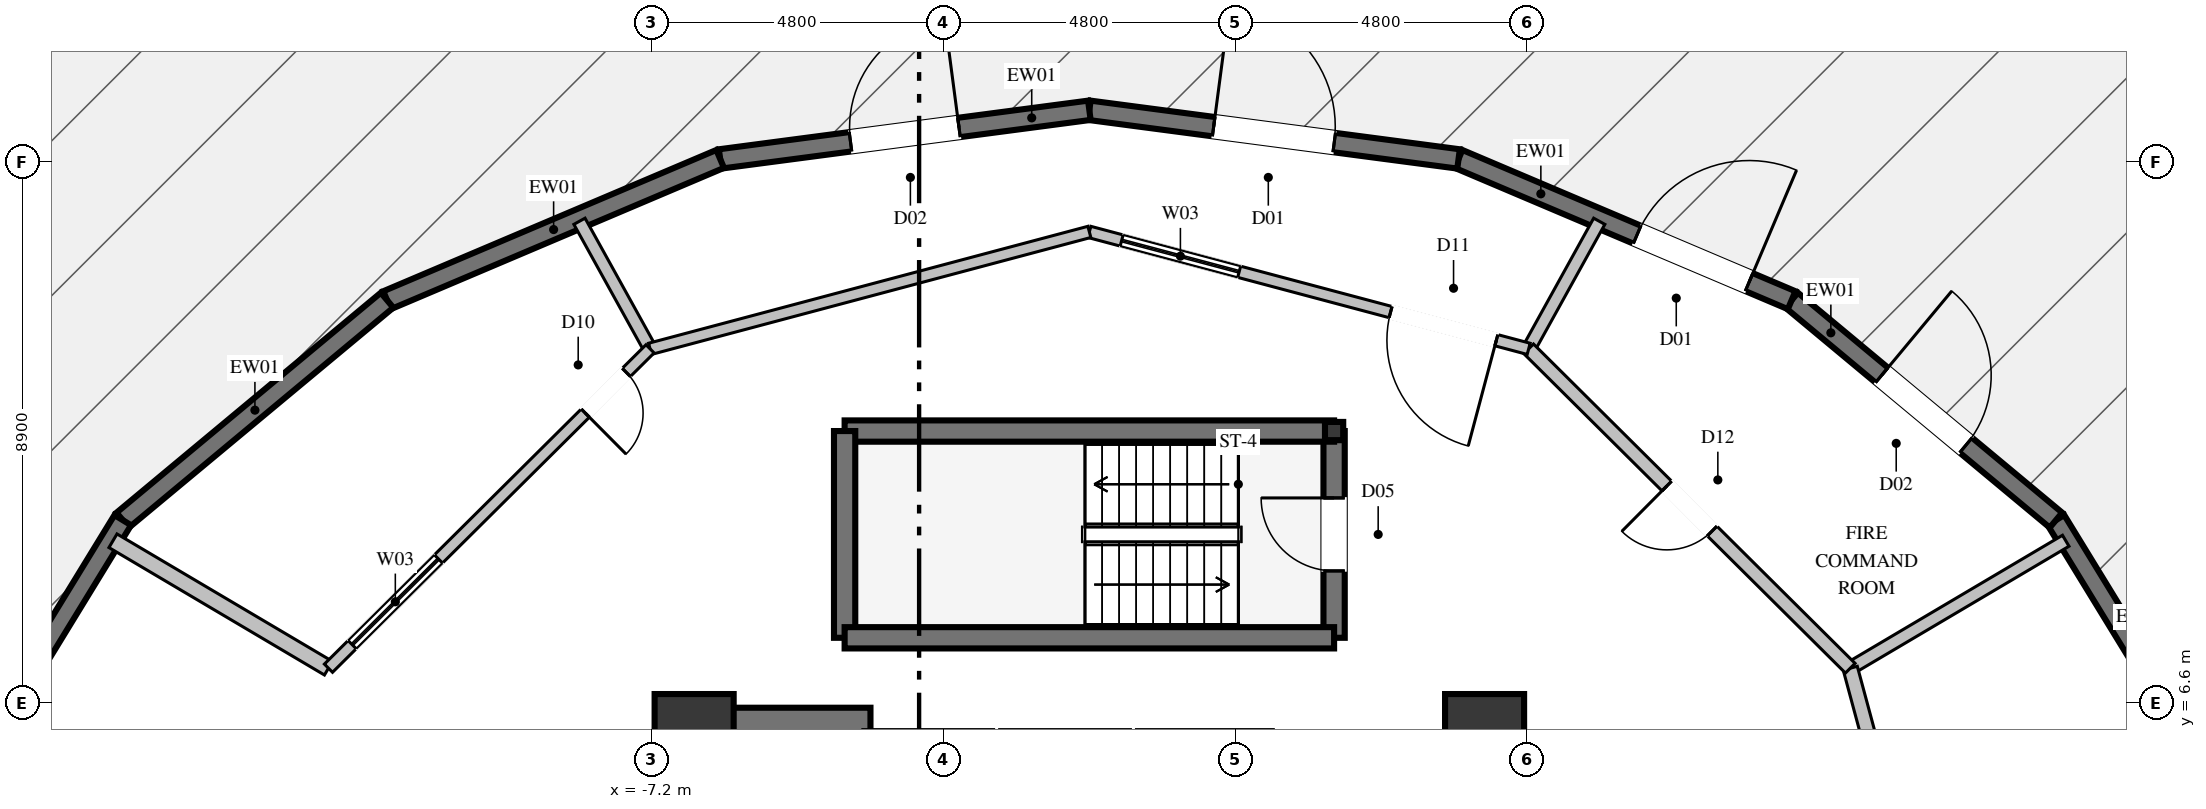
"""IFC4 building model, lengths in metres.
Left out: names, types, materials, properties, quantities, classifications, styles, units other than length and angle.
Written with IfcOpenShell. Run it as: python <this file> out.ifc"""

import sys

from ifc_helpers import new_model, si_unit, direction, frame, frame_2d, origin, origin_2d, place, context, subcontext, project, spatial, rectangle, hollow_rectangle, extrude, element, fill, save


model = new_model("IFC4")
c1 = context("Model", 3, precision=1e-05, world=origin(), true_north=direction((0.0, 1.0)))
c2 = subcontext(c1, "Body", "Model", "MODEL_VIEW")
j1 = project(units=[si_unit("LENGTHUNIT", "METRE"), si_unit("PLANEANGLEUNIT", "RADIAN")], contexts=[c1])
p1 = place(None, origin())
s1 = spatial("IfcSite", under=j1, at=p1, CompositionType="ELEMENT")
p2 = place(p1, origin())
s2 = spatial("IfcBuilding", under=s1, at=p2, CompositionType="ELEMENT")
p3 = place(p2, origin())
s3 = spatial("IfcBuildingStorey", under=s2, at=p3, CompositionType="ELEMENT", Elevation=0.0)
for number, where, z_axis, x_axis in (
    (1, (6.5, 6.1, 0.0), (0.0, 0.0, 1.0), (1.0, 0.0, 0.0)),
    (2, (-6.5, 6.1, 0.0), (0.0, 0.0, 1.0), (1.0, 0.0, 0.0)),
):
    element("IfcColumn", number, at=place(p3, frame(where, z_axis=z_axis, x_axis=x_axis)), inside=s3, PredefinedType="COLUMN", context=c2, shape_type="SweptSolid", body=[
        extrude(rectangle(XDim=1.3, YDim=1.3, at=origin_2d()), origin(), (0.0, 0.0, 1.0), 7.2),
    ])
p4 = place(p3, frame((-6.075, 6.1, 0.0), z_axis=(0.0, 0.0, 1.0), x_axis=(1.0, 0.0, 0.0)))
e3 = element("IfcWall", 3, at=p4, inside=s3, PredefinedType="SHEAR", context=c2, shape_type="SweptSolid", body=[
    extrude(rectangle(XDim=2.475, YDim=0.85, at=frame_2d((1.237, 0.0))), origin(), (0.0, 0.0, 1.0), 7.2),
])
p5 = place(p3, frame((5.85, 6.1, 0.0), z_axis=(0.0, 0.0, 1.0), x_axis=(1.0, 0.0, 0.0)))
e4 = element("IfcWall", 4, at=p5, inside=s3, PredefinedType="SHEAR", context=c2, shape_type="SweptSolid", body=[
    extrude(rectangle(XDim=0.225, YDim=0.85, at=frame_2d((0.112, 0.0))), origin(), (0.0, 0.0, 1.0), 7.2),
])
p6 = place(p3, frame((-6.5, 2.35, 0.0), z_axis=(0.0, 0.0, 1.0), x_axis=(0.0, 1.0, 0.0)))
e5 = element("IfcWall", 5, at=p6, inside=s3, PredefinedType="SHEAR", context=c2, shape_type="SweptSolid", body=[
    extrude(rectangle(XDim=4.175, YDim=0.85, at=frame_2d((2.087, 0.0))), origin(), (0.0, 0.0, 1.0), 7.2),
])
p7 = place(p3, frame((6.5, 3.35, 0.0), z_axis=(0.0, 0.0, 1.0), x_axis=(0.0, 1.0, 0.0)))
e6 = element("IfcWall", 6, at=p7, inside=s3, PredefinedType="SHEAR", context=c2, shape_type="SweptSolid", body=[
    extrude(rectangle(XDim=3.175, YDim=0.85, at=frame_2d((1.587, 0.0))), origin(), (0.0, 0.0, 1.0), 7.2),
])
p8 = place(p3, frame((4.025, 11.075, 0.0), z_axis=(0.0, 0.0, 1.0), x_axis=(1.0, 0.0, 0.0)))
e7 = element("IfcColumn", 7, at=p8, inside=s3, PredefinedType="COLUMN", context=c2, shape_type="SweptSolid", body=[
    extrude(hollow_rectangle(XDim=0.3, YDim=0.3, WallThickness=0.016, at=origin_2d()), origin(), (0.0, 0.0, 1.0), 7.2),
])
p9 = place(p3, frame((15.897, 9.61, 0.0), z_axis=(0.0, 0.0, 1.0), x_axis=(0.522199966643, -0.852823073585, 0.0)))
e8 = element("IfcWall", 8, at=p9, inside=s3, PredefinedType="SOLIDWALL", context=c2, shape_type="SweptSolid", body=[
    extrude(rectangle(XDim=5.345, YDim=0.32, at=frame_2d((2.672, 0.0))), origin(), (0.0, 0.0, 1.0), 6.84),
])
p10 = place(p3, frame((11.55, 13.227, 0.0), z_axis=(0.0, 0.0, 1.0), x_axis=(0.768698801906, -0.639610937952, 0.0)))
e9 = element("IfcWall", 9, at=p10, inside=s3, PredefinedType="SOLIDWALL", context=c2, shape_type="SweptSolid", body=[
    extrude(rectangle(XDim=5.655, YDim=0.32, at=frame_2d((2.828, 0.0))), origin(), (0.0, 0.0, 1.0), 6.84),
])
p11 = place(p10, frame((1.928, 0.0, 0.0)))
e10 = element("IfcOpeningElement", 10, at=p11, cuts=e9, PredefinedType="OPENING", context=c2, shape_type="SweptSolid", body=[
    extrude(rectangle(XDim=1.8, YDim=2.4, at=frame_2d((0.9, 1.2))), frame((0.0, 0.17, 0.0), z_axis=(0.0, -1.0, 0.0), x_axis=(1.0, 0.0, 0.0)), (0.0, 0.0, 1.0), 0.34),
])
p12 = place(p3, frame((6.072, 15.55, 0.0), z_axis=(0.0, 0.0, 1.0), x_axis=(0.920643013012, -0.390405484839, 0.0)))
e11 = element("IfcWall", 11, at=p12, inside=s3, PredefinedType="SOLIDWALL", context=c2, shape_type="SweptSolid", body=[
    extrude(rectangle(XDim=5.95, YDim=0.32, at=frame_2d((2.975, 0.0))), origin(), (0.0, 0.0, 1.0), 6.84),
])
p13 = place(p12, frame((3.19, 0.0, 0.0)))
e12 = element("IfcOpeningElement", 12, at=p13, cuts=e11, PredefinedType="OPENING", context=c2, shape_type="SweptSolid", body=[
    extrude(rectangle(XDim=2.0, YDim=2.4, at=frame_2d((1.0, 1.2))), frame((0.0, 0.17, 0.0), z_axis=(0.0, -1.0, 0.0), x_axis=(1.0, 0.0, 0.0)), (0.0, 0.0, 1.0), 0.34),
])
p14 = place(p3, frame((0.0, 16.35, 0.0), z_axis=(0.0, 0.0, 1.0), x_axis=(0.991431078494, -0.130630840908, 0.0)))
e13 = element("IfcWall", 13, at=p14, inside=s3, PredefinedType="SOLIDWALL", context=c2, shape_type="SweptSolid", body=[
    extrude(rectangle(XDim=6.125, YDim=0.32, at=frame_2d((3.062, 0.0))), origin(), (0.0, 0.0, 1.0), 6.84),
])
p15 = place(p14, frame((2.062, 0.0, 0.0)))
e14 = element("IfcOpeningElement", 14, at=p15, cuts=e13, PredefinedType="OPENING", context=c2, shape_type="SweptSolid", body=[
    extrude(rectangle(XDim=2.0, YDim=2.4, at=frame_2d((1.0, 1.2))), frame((0.0, 0.17, 0.0), z_axis=(0.0, -1.0, 0.0), x_axis=(1.0, 0.0, 0.0)), (0.0, 0.0, 1.0), 0.34),
])
p16 = place(p3, frame((-6.072, 15.55, 0.0), z_axis=(0.0, 0.0, 1.0), x_axis=(0.991431078494, 0.130630840908, 0.0)))
e15 = element("IfcWall", 15, at=p16, inside=s3, PredefinedType="SOLIDWALL", context=c2, shape_type="SweptSolid", body=[
    extrude(rectangle(XDim=6.125, YDim=0.32, at=frame_2d((3.062, 0.0))), origin(), (0.0, 0.0, 1.0), 6.84),
])
p17 = place(p16, frame((2.162, 0.0, 0.0)))
e16 = element("IfcOpeningElement", 16, at=p17, cuts=e15, PredefinedType="OPENING", context=c2, shape_type="SweptSolid", body=[
    extrude(rectangle(XDim=1.8, YDim=2.4, at=frame_2d((0.9, 1.2))), frame((0.0, 0.17, 0.0), z_axis=(0.0, -1.0, 0.0), x_axis=(1.0, 0.0, 0.0)), (0.0, 0.0, 1.0), 0.34),
])
p18 = place(p3, frame((-11.55, 13.227, 0.0), z_axis=(0.0, 0.0, 1.0), x_axis=(0.920643013012, 0.390405484839, 0.0)))
e17 = element("IfcWall", 17, at=p18, inside=s3, PredefinedType="SOLIDWALL", context=c2, shape_type="SweptSolid", body=[
    extrude(rectangle(XDim=5.95, YDim=0.32, at=frame_2d((2.975, 0.0))), origin(), (0.0, 0.0, 1.0), 6.84),
])
p19 = place(p3, frame((-15.897, 9.61, 0.0), z_axis=(0.0, 0.0, 1.0), x_axis=(0.768698801906, 0.639610937952, 0.0)))
e18 = element("IfcWall", 18, at=p19, inside=s3, PredefinedType="SOLIDWALL", context=c2, shape_type="SweptSolid", body=[
    extrude(rectangle(XDim=5.655, YDim=0.32, at=frame_2d((2.828, 0.0))), origin(), (0.0, 0.0, 1.0), 6.84),
])
p20 = place(p3, frame((-18.688, 5.052, 0.0), z_axis=(0.0, 0.0, 1.0), x_axis=(0.522199966643, 0.852823073585, 0.0)))
e19 = element("IfcWall", 19, at=p20, inside=s3, PredefinedType="SOLIDWALL", context=c2, shape_type="SweptSolid", body=[
    extrude(rectangle(XDim=5.345, YDim=0.32, at=frame_2d((2.672, 0.0))), origin(), (0.0, 0.0, 1.0), 6.84),
])
p21 = place(p3, frame((4.025, 7.675, 0.0), z_axis=(0.0, 0.0, 1.0), x_axis=(0.0, 1.0, 0.0)))
e20 = element("IfcWall", 20, at=p21, inside=s3, PredefinedType="SOLIDWALL", context=c2, shape_type="SweptSolid", body=[
    extrude(rectangle(XDim=3.4, YDim=0.35, at=frame_2d((1.7, 0.0))), origin(), (0.0, 0.0, 1.0), 6.84),
])
p22 = place(p21, frame((1.1, 0.0, 0.0)))
e21 = element("IfcOpeningElement", 21, at=p22, cuts=e20, PredefinedType="OPENING", context=c2, shape_type="SweptSolid", body=[
    extrude(rectangle(XDim=1.2, YDim=2.2, at=frame_2d((0.6, 1.1))), frame((0.0, 0.185, 0.0), z_axis=(0.0, -1.0, 0.0), x_axis=(1.0, 0.0, 0.0)), (0.0, 0.0, 1.0), 0.37),
])
p23 = place(p3, frame((4.025, 11.075, 0.0), z_axis=(0.0, 0.0, 1.0), x_axis=(-1.0, 0.0, 0.0)))
e22 = element("IfcWall", 22, at=p23, inside=s3, PredefinedType="SOLIDWALL", context=c2, shape_type="SweptSolid", body=[
    extrude(rectangle(XDim=8.05, YDim=0.35, at=frame_2d((4.025, 0.0))), origin(), (0.0, 0.0, 1.0), 6.84),
])
p24 = place(p3, frame((-4.025, 11.075, 0.0), z_axis=(0.0, 0.0, 1.0), x_axis=(0.0, -1.0, 0.0)))
e23 = element("IfcWall", 23, at=p24, inside=s3, PredefinedType="SOLIDWALL", context=c2, shape_type="SweptSolid", body=[
    extrude(rectangle(XDim=3.4, YDim=0.35, at=frame_2d((1.7, 0.0))), origin(), (0.0, 0.0, 1.0), 6.84),
])
p25 = place(p3, frame((-4.025, 7.675, 0.0), z_axis=(0.0, 0.0, 1.0), x_axis=(1.0, 0.0, 0.0)))
e24 = element("IfcWall", 24, at=p25, inside=s3, PredefinedType="SOLIDWALL", context=c2, shape_type="SweptSolid", body=[
    extrude(rectangle(XDim=8.05, YDim=0.35, at=frame_2d((4.025, 0.0))), origin(), (0.0, 0.0, 1.0), 6.84),
])
p26 = place(p3, frame((12.514, 7.175, 0.0), z_axis=(0.0, 0.0, 1.0), x_axis=(0.860750596586, 0.509026925101, 0.0)))
e25 = element("IfcWall", 25, at=p26, inside=s3, PredefinedType="PARTITIONING", context=c2, shape_type="SweptSolid", body=[
    extrude(rectangle(XDim=4.118, YDim=0.21, at=frame_2d((2.059, 0.0))), origin(), (0.0, 0.0, 1.0), 4.625),
])
for number, where, z_axis, x_axis in (
    (26, (7.225, 12.427, 0.0), (0.0, 0.0, 1.0), (0.484, 0.875, 0.0)),
    (27, (-7.225, 12.427, 0.0), (0.0, 0.0, 1.0), (-0.484, 0.875, 0.0)),
):
    element("IfcWall", number, at=place(p3, frame(where, z_axis=z_axis, x_axis=x_axis)), inside=s3, PredefinedType="PARTITIONING", context=c2, shape_type="SweptSolid", body=[
        extrude(rectangle(XDim=2.398, YDim=0.21, at=frame_2d((1.199, 0.0))), origin(), (0.0, 0.0, 1.0), 4.625),
    ])
p27 = place(p3, frame((-12.514, 7.175, 0.0), z_axis=(0.0, 0.0, 1.0), x_axis=(-0.860750596586, 0.509026925101, 0.0)))
e28 = element("IfcWall", 28, at=p27, inside=s3, PredefinedType="PARTITIONING", context=c2, shape_type="SweptSolid", body=[
    extrude(rectangle(XDim=4.118, YDim=0.26, at=frame_2d((2.059, 0.0))), origin(), (0.0, 0.0, 1.0), 4.625),
])
p28 = place(p3, frame((14.45, 0.0, 0.0), z_axis=(0.0, 0.0, 1.0), x_axis=(-0.260511833978, 0.965470654322, 0.0)))
e29 = element("IfcWall", 29, at=p28, inside=s3, PredefinedType="PARTITIONING", context=c2, shape_type="SweptSolid", body=[
    extrude(rectangle(XDim=7.432, YDim=0.24, at=frame_2d((3.716, 0.0))), origin(), (0.0, 0.0, 1.0), 6.84),
])
p29 = place(p28, frame((3.241, 0.0, 0.0)))
e30 = element("IfcOpeningElement", 30, at=p29, cuts=e29, PredefinedType="OPENING", context=c2, shape_type="SweptSolid", body=[
    extrude(rectangle(XDim=0.95, YDim=2.1, at=frame_2d((0.475, 1.05))), frame((0.0, 0.13, 0.0), z_axis=(0.0, -1.0, 0.0), x_axis=(1.0, 0.0, 0.0)), (0.0, 0.0, 1.0), 0.26),
])
p30 = place(p3, frame((12.514, 7.175, 0.0), z_axis=(0.0, 0.0, 1.0), x_axis=(-0.709575472763, 0.704629440524, 0.0)))
e31 = element("IfcWall", 31, at=p30, inside=s3, PredefinedType="PARTITIONING", context=c2, shape_type="SweptSolid", body=[
    extrude(rectangle(XDim=7.454, YDim=0.225, at=frame_2d((3.727, 0.0))), origin(), (0.0, 0.0, 1.0), 6.84),
])
p31 = place(p30, frame((3.202, 0.0, 0.0)))
e32 = element("IfcOpeningElement", 32, at=p31, cuts=e31, PredefinedType="OPENING", context=c2, shape_type="SweptSolid", body=[
    extrude(rectangle(XDim=1.05, YDim=2.15, at=frame_2d((0.525, 1.075))), frame((0.0, 0.123, 0.0), z_axis=(0.0, -1.0, 0.0), x_axis=(1.0, 0.0, 0.0)), (0.0, 0.0, 1.0), 0.245),
])
p32 = place(p3, frame((7.225, 12.427, 0.0), z_axis=(0.0, 0.0, 1.0), x_axis=(-0.966354610728, 0.25721346451, 0.0)))
e33 = element("IfcWall", 33, at=p32, inside=s3, PredefinedType="PARTITIONING", context=c2, shape_type="SweptSolid", body=[
    extrude(rectangle(XDim=7.477, YDim=0.19, at=frame_2d((3.738, 0.0))), origin(), (0.0, 0.0, 1.0), 6.84),
])
p33 = place(p32, frame((0.55, 0.0, 0.0)))
e34 = element("IfcOpeningElement", 34, at=p33, cuts=e33, PredefinedType="OPENING", context=c2, shape_type="SweptSolid", body=[
    extrude(rectangle(XDim=1.8, YDim=2.4, at=frame_2d((0.9, 1.2))), frame((0.0, 0.105, 0.0), z_axis=(0.0, -1.0, 0.0), x_axis=(1.0, 0.0, 0.0)), (0.0, 0.0, 1.0), 0.21),
])
p34 = place(p32, frame((4.927, 0.0, 0.9)))
e35 = element("IfcOpeningElement", 35, at=p34, cuts=e33, PredefinedType="OPENING", context=c2, shape_type="SweptSolid", body=[
    extrude(rectangle(XDim=2.0, YDim=1.6, at=frame_2d((1.0, 0.8))), frame((0.0, 0.105, 0.0), z_axis=(0.0, -1.0, 0.0), x_axis=(1.0, 0.0, 0.0)), (0.0, 0.0, 1.0), 0.21),
])
p35 = place(p3, frame((0.0, 14.35, 0.0), z_axis=(0.0, 0.0, 1.0), x_axis=(-0.966354610728, -0.25721346451, 0.0)))
e36 = element("IfcWall", 36, at=p35, inside=s3, PredefinedType="PARTITIONING", context=c2, shape_type="SweptSolid", body=[
    extrude(rectangle(XDim=7.477, YDim=0.19, at=frame_2d((3.738, 0.0))), origin(), (0.0, 0.0, 1.0), 6.84),
])
p36 = place(p3, frame((-7.225, 12.427, 0.0), z_axis=(0.0, 0.0, 1.0), x_axis=(-0.709575472763, -0.704629440524, 0.0)))
e37 = element("IfcWall", 37, at=p36, inside=s3, PredefinedType="PARTITIONING", context=c2, shape_type="SweptSolid", body=[
    extrude(rectangle(XDim=7.454, YDim=0.19, at=frame_2d((3.727, 0.0))), origin(), (0.0, 0.0, 1.0), 6.84),
])
p37 = place(p36, frame((0.55, 0.0, 0.0)))
e38 = element("IfcOpeningElement", 38, at=p37, cuts=e37, PredefinedType="OPENING", context=c2, shape_type="SweptSolid", body=[
    extrude(rectangle(XDim=0.95, YDim=2.1, at=frame_2d((0.475, 1.05))), frame((0.0, 0.105, 0.0), z_axis=(0.0, -1.0, 0.0), x_axis=(1.0, 0.0, 0.0)), (0.0, 0.0, 1.0), 0.21),
])
p38 = place(p36, frame((4.904, 0.0, 0.9)))
e39 = element("IfcOpeningElement", 39, at=p38, cuts=e37, PredefinedType="OPENING", context=c2, shape_type="SweptSolid", body=[
    extrude(rectangle(XDim=2.0, YDim=1.6, at=frame_2d((1.0, 0.8))), frame((0.0, 0.105, 0.0), z_axis=(0.0, -1.0, 0.0), x_axis=(1.0, 0.0, 0.0)), (0.0, 0.0, 1.0), 0.21),
])
p39 = place(p11, origin())
e40 = element("IfcDoor", 40, at=p39, inside=s3, OperationType="SINGLE_SWING_LEFT", PredefinedType="DOOR", context=c2, shape_type="SweptSolid", body=[
    extrude(rectangle(XDim=1.8, YDim=2.4, at=frame_2d((0.9, 1.2))), frame((0.0, 0.025, 0.0), z_axis=(0.0, -1.0, 0.0), x_axis=(1.0, 0.0, 0.0)), (0.0, 0.0, 1.0), 0.05),
])
fill(e10, e40)
p40 = place(p13, origin())
e41 = element("IfcDoor", 41, at=p40, inside=s3, OperationType="SINGLE_SWING_RIGHT", PredefinedType="DOOR", context=c2, shape_type="SweptSolid", body=[
    extrude(rectangle(XDim=2.0, YDim=2.4, at=frame_2d((1.0, 1.2))), frame((0.0, 0.025, 0.0), z_axis=(0.0, -1.0, 0.0), x_axis=(1.0, 0.0, 0.0)), (0.0, 0.0, 1.0), 0.05),
])
fill(e12, e41)
p41 = place(p15, origin())
e42 = element("IfcDoor", 42, at=p41, inside=s3, OperationType="SINGLE_SWING_LEFT", PredefinedType="DOOR", context=c2, shape_type="SweptSolid", body=[
    extrude(rectangle(XDim=2.0, YDim=2.4, at=frame_2d((1.0, 1.2))), frame((0.0, 0.025, 0.0), z_axis=(0.0, -1.0, 0.0), x_axis=(1.0, 0.0, 0.0)), (0.0, 0.0, 1.0), 0.05),
])
fill(e14, e42)
p42 = place(p17, origin())
e43 = element("IfcDoor", 43, at=p42, inside=s3, OperationType="SINGLE_SWING_RIGHT", PredefinedType="DOOR", context=c2, shape_type="SweptSolid", body=[
    extrude(rectangle(XDim=1.8, YDim=2.4, at=frame_2d((0.9, 1.2))), frame((0.0, 0.025, 0.0), z_axis=(0.0, -1.0, 0.0), x_axis=(1.0, 0.0, 0.0)), (0.0, 0.0, 1.0), 0.05),
])
fill(e16, e43)
p43 = place(p22, origin())
e44 = element("IfcDoor", 44, at=p43, inside=s3, OperationType="SINGLE_SWING_RIGHT", PredefinedType="DOOR", context=c2, shape_type="SweptSolid", body=[
    extrude(rectangle(XDim=1.2, YDim=2.2, at=frame_2d((0.6, 1.1))), frame((0.0, 0.025, 0.0), z_axis=(0.0, -1.0, 0.0), x_axis=(1.0, 0.0, 0.0)), (0.0, 0.0, 1.0), 0.05),
])
fill(e21, e44)
p44 = place(p31, origin())
e45 = element("IfcDoor", 45, at=p44, inside=s3, OperationType="SINGLE_SWING_RIGHT", PredefinedType="DOOR", context=c2, shape_type="SweptSolid", body=[
    extrude(rectangle(XDim=1.05, YDim=2.15, at=frame_2d((0.525, 1.075))), frame((0.0, 0.025, 0.0), z_axis=(0.0, -1.0, 0.0), x_axis=(1.0, 0.0, 0.0)), (0.0, 0.0, 1.0), 0.05),
])
fill(e32, e45)
p45 = place(p33, origin())
e46 = element("IfcDoor", 46, at=p45, inside=s3, OperationType="SINGLE_SWING_LEFT", PredefinedType="DOOR", context=c2, shape_type="SweptSolid", body=[
    extrude(rectangle(XDim=1.8, YDim=2.4, at=frame_2d((0.9, 1.2))), frame((0.0, 0.025, 0.0), z_axis=(0.0, -1.0, 0.0), x_axis=(1.0, 0.0, 0.0)), (0.0, 0.0, 1.0), 0.05),
])
fill(e34, e46)
p46 = place(p34, origin())
e47 = element("IfcWindow", 47, at=p46, inside=s3, PartitioningType="SINGLE_PANEL", PredefinedType="WINDOW", context=c2, shape_type="SweptSolid", body=[
    extrude(rectangle(XDim=2.0, YDim=1.6, at=frame_2d((1.0, 0.8))), frame((0.0, 0.03, 0.0), z_axis=(0.0, -1.0, 0.0), x_axis=(1.0, 0.0, 0.0)), (0.0, 0.0, 1.0), 0.06),
])
fill(e35, e47)
p47 = place(p37, origin())
e48 = element("IfcDoor", 48, at=p47, inside=s3, OperationType="SINGLE_SWING_RIGHT", PredefinedType="DOOR", context=c2, shape_type="SweptSolid", body=[
    extrude(rectangle(XDim=0.95, YDim=2.1, at=frame_2d((0.475, 1.05))), frame((0.0, 0.025, 0.0), z_axis=(0.0, -1.0, 0.0), x_axis=(1.0, 0.0, 0.0)), (0.0, 0.0, 1.0), 0.05),
])
fill(e38, e48)
p48 = place(p38, origin())
e49 = element("IfcWindow", 49, at=p48, inside=s3, PartitioningType="SINGLE_PANEL", PredefinedType="WINDOW", context=c2, shape_type="SweptSolid", body=[
    extrude(rectangle(XDim=2.0, YDim=1.6, at=frame_2d((1.0, 0.8))), frame((0.0, 0.03, 0.0), z_axis=(0.0, -1.0, 0.0), x_axis=(1.0, 0.0, 0.0)), (0.0, 0.0, 1.0), 0.06),
])
fill(e39, e49)
save(model, sys.argv[1])
